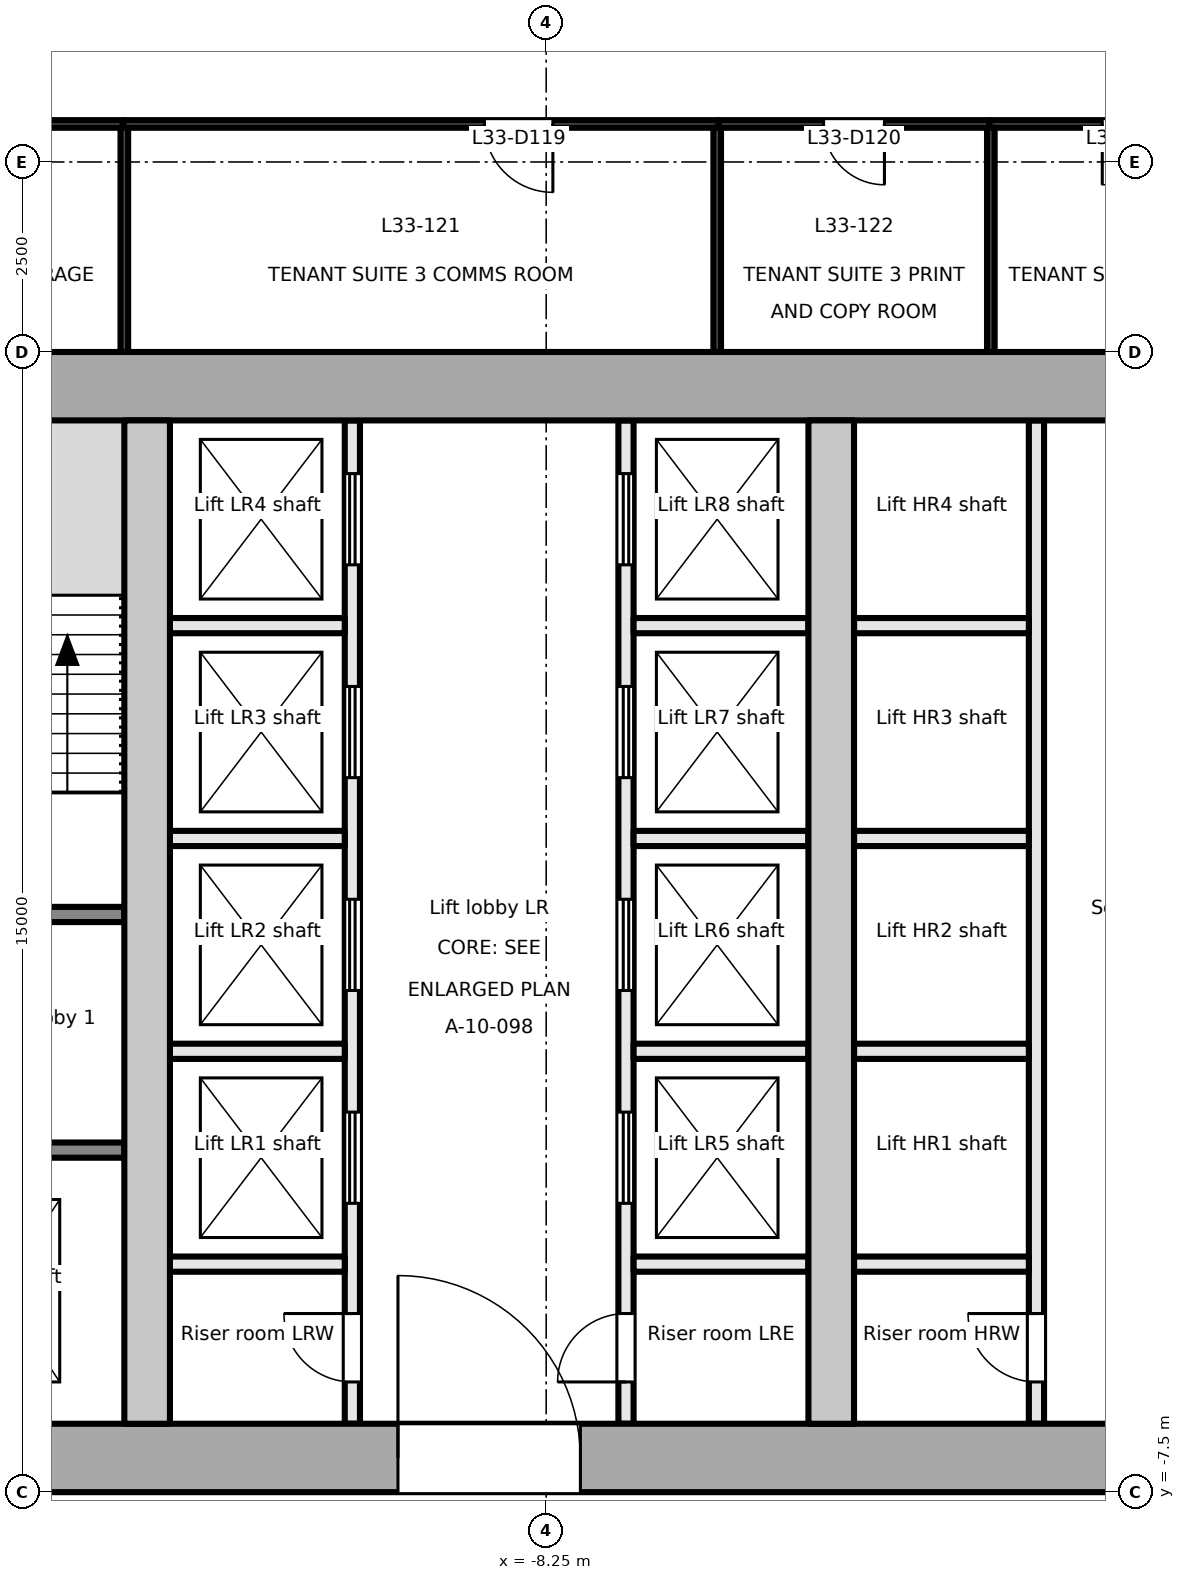
"""IFC4 building model, lengths in metres.
Left out: names, types, materials, properties, quantities, classifications, styles, units other than length and angle.
Written with IfcOpenShell. Run it as: python <this file> out.ifc"""

import sys

from ifc_helpers import new_model, si_unit, direction, frame, frame_2d, origin, place, context, subcontext, project, spatial, rectangle, extrude, element, fill, save


model = new_model("IFC4")
c1 = context("Model", 3, precision=1e-05, world=origin(), true_north=direction((0.0, 1.0)))
c2 = subcontext(c1, "Body", "Model", "MODEL_VIEW")
j1 = project(units=[si_unit("LENGTHUNIT", "METRE"), si_unit("PLANEANGLEUNIT", "RADIAN")], contexts=[c1])
p1 = place(None, origin())
s1 = spatial("IfcSite", under=j1, at=p1, CompositionType="ELEMENT")
p2 = place(p1, origin())
s2 = spatial("IfcBuilding", under=s1, at=p2, CompositionType="ELEMENT")
p3 = place(p2, frame((0.0, 0.0, 146.1)))
s3 = spatial("IfcBuildingStorey", under=s2, at=p3, CompositionType="ELEMENT", Elevation=146.1)
p4 = place(p3, frame((-18.0, -7.05, -0.2), z_axis=(0.0, 0.0, 1.0), x_axis=(1.0, 0.0, 0.0)))
e1 = element("IfcWall", 1, at=p4, inside=s3, PredefinedType="SHEAR", context=c2, shape_type="SweptSolid", body=[
    extrude(rectangle(XDim=36.0, YDim=0.9, at=frame_2d((18.0, 0.0))), origin(), (0.0, 0.0, 1.0), 4.0),
])
p5 = place(p4, frame((7.8, 0.0, 0.2)))
e2 = element("IfcOpeningElement", 2, at=p5, cuts=e1, PredefinedType="OPENING", context=c2, shape_type="SweptSolid", body=[
    extrude(rectangle(XDim=2.4, YDim=2.1, at=frame_2d((1.2, 1.05))), frame((0.0, 0.46, 0.0), z_axis=(0.0, -1.0, 0.0), x_axis=(1.0, 0.0, 0.0)), (0.0, 0.0, 1.0), 0.921),
])
p6 = place(p4, frame((17.4, 0.0, 0.2)))
e3 = element("IfcOpeningElement", 3, at=p6, cuts=e1, PredefinedType="OPENING", context=c2, shape_type="SweptSolid", body=[
    extrude(rectangle(XDim=1.2, YDim=2.1, at=frame_2d((0.6, 1.05))), frame((0.0, 0.46, 0.0), z_axis=(0.0, -1.0, 0.0), x_axis=(1.0, 0.0, 0.0)), (0.0, 0.0, 1.0), 0.921),
])
p7 = place(p4, frame((26.1, 0.0, 0.2)))
e4 = element("IfcOpeningElement", 4, at=p7, cuts=e1, PredefinedType="OPENING", context=c2, shape_type="SweptSolid", body=[
    extrude(rectangle(XDim=2.4, YDim=2.1, at=frame_2d((1.2, 1.05))), frame((0.0, 0.46, 0.0), z_axis=(0.0, -1.0, 0.0), x_axis=(1.0, 0.0, 0.0)), (0.0, 0.0, 1.0), 0.921),
])
p8 = place(p3, frame((-18.0, 7.05, -0.2), z_axis=(0.0, 0.0, 1.0), x_axis=(1.0, 0.0, 0.0)))
e5 = element("IfcWall", 5, at=p8, inside=s3, PredefinedType="SHEAR", context=c2, shape_type="SweptSolid", body=[
    extrude(rectangle(XDim=36.0, YDim=0.9, at=frame_2d((18.0, 0.0))), origin(), (0.0, 0.0, 1.0), 4.0),
])
for number, where, z_axis, x_axis in (
    (6, (-13.5, -6.6, -0.2), (0.0, 0.0, 1.0), (0.0, 1.0, 0.0)),
    (7, (-4.5, -6.6, -0.2), (0.0, 0.0, 1.0), (0.0, 1.0, 0.0)),
):
    element("IfcWall", number, at=place(p3, frame(where, z_axis=z_axis, x_axis=x_axis)), inside=s3, PredefinedType="SHEAR", context=c2, shape_type="SweptSolid", body=[
        extrude(rectangle(XDim=13.2, YDim=0.6, at=frame_2d((6.6, 0.0))), origin(), (0.0, 0.0, 1.0), 4.0),
    ])
p9 = place(p3, frame((-17.1, -3.0, 0.0), z_axis=(0.0, 0.0, 1.0), x_axis=(1.0, 0.0, 0.0)))
e8 = element("IfcWall", 8, at=p9, inside=s3, PredefinedType="PARTITIONING", context=c2, shape_type="SweptSolid", body=[
    extrude(rectangle(XDim=3.3, YDim=0.2, at=frame_2d((1.65, 0.0))), origin(), (0.0, 0.0, 1.0), 3.8),
])
p10 = place(p9, frame((1.1, 0.0, 0.0)))
e9 = element("IfcOpeningElement", 9, at=p10, cuts=e8, PredefinedType="OPENING", context=c2, shape_type="SweptSolid", body=[
    extrude(rectangle(XDim=1.1, YDim=2.1, at=frame_2d((0.55, 1.05))), frame((0.0, 0.111, 0.0), z_axis=(0.0, -1.0, 0.0), x_axis=(1.0, 0.0, 0.0)), (0.0, 0.0, 1.0), 0.221),
])
p11 = place(p3, frame((-17.1, 0.1, 0.0), z_axis=(0.0, 0.0, 1.0), x_axis=(1.0, 0.0, 0.0)))
e10 = element("IfcWall", 10, at=p11, inside=s3, PredefinedType="PARTITIONING", context=c2, shape_type="SweptSolid", body=[
    extrude(rectangle(XDim=3.3, YDim=0.2, at=frame_2d((1.65, 0.0))), origin(), (0.0, 0.0, 1.0), 3.8),
])
p12 = place(p11, frame((1.1, 0.0, 0.0)))
e11 = element("IfcOpeningElement", 11, at=p12, cuts=e10, PredefinedType="OPENING", context=c2, shape_type="SweptSolid", body=[
    extrude(rectangle(XDim=1.1, YDim=2.1, at=frame_2d((0.55, 1.05))), frame((0.0, 0.111, 0.0), z_axis=(0.0, -1.0, 0.0), x_axis=(1.0, 0.0, 0.0)), (0.0, 0.0, 1.0), 0.221),
])
p13 = place(p3, frame((-10.8, -6.6, 0.0), z_axis=(0.0, 0.0, 1.0), x_axis=(0.0, 1.0, 0.0)))
e12 = element("IfcWall", 12, at=p13, inside=s3, PredefinedType="PARTITIONING", context=c2, shape_type="SweptSolid", body=[
    extrude(rectangle(XDim=13.2, YDim=0.2, at=frame_2d((6.6, 0.0))), origin(), (0.0, 0.0, 1.0), 3.8),
])
p14 = place(p13, frame((0.55, 0.0, 0.0)))
e13 = element("IfcOpeningElement", 13, at=p14, cuts=e12, PredefinedType="OPENING", context=c2, shape_type="SweptSolid", body=[
    extrude(rectangle(XDim=0.9, YDim=2.1, at=frame_2d((0.45, 1.05))), frame((0.0, 0.111, 0.0), z_axis=(0.0, -1.0, 0.0), x_axis=(1.0, 0.0, 0.0)), (0.0, 0.0, 1.0), 0.221),
])
p15 = place(p13, frame((2.9, 0.0, 0.0)))
e14 = element("IfcOpeningElement", 14, at=p15, cuts=e12, PredefinedType="OPENING", context=c2, shape_type="SweptSolid", body=[
    extrude(rectangle(XDim=1.2, YDim=2.1, at=frame_2d((0.6, 1.05))), frame((0.0, 0.111, 0.0), z_axis=(0.0, -1.0, 0.0), x_axis=(1.0, 0.0, 0.0)), (0.0, 0.0, 1.0), 0.221),
])
p16 = place(p13, frame((5.7, 0.0, 0.0)))
e15 = element("IfcOpeningElement", 15, at=p16, cuts=e12, PredefinedType="OPENING", context=c2, shape_type="SweptSolid", body=[
    extrude(rectangle(XDim=1.2, YDim=2.1, at=frame_2d((0.6, 1.05))), frame((0.0, 0.111, 0.0), z_axis=(0.0, -1.0, 0.0), x_axis=(1.0, 0.0, 0.0)), (0.0, 0.0, 1.0), 0.221),
])
p17 = place(p13, frame((8.5, 0.0, 0.0)))
e16 = element("IfcOpeningElement", 16, at=p17, cuts=e12, PredefinedType="OPENING", context=c2, shape_type="SweptSolid", body=[
    extrude(rectangle(XDim=1.2, YDim=2.1, at=frame_2d((0.6, 1.05))), frame((0.0, 0.111, 0.0), z_axis=(0.0, -1.0, 0.0), x_axis=(1.0, 0.0, 0.0)), (0.0, 0.0, 1.0), 0.221),
])
p18 = place(p13, frame((11.3, 0.0, 0.0)))
e17 = element("IfcOpeningElement", 17, at=p18, cuts=e12, PredefinedType="OPENING", context=c2, shape_type="SweptSolid", body=[
    extrude(rectangle(XDim=1.2, YDim=2.1, at=frame_2d((0.6, 1.05))), frame((0.0, 0.111, 0.0), z_axis=(0.0, -1.0, 0.0), x_axis=(1.0, 0.0, 0.0)), (0.0, 0.0, 1.0), 0.221),
])
p19 = place(p3, frame((-7.2, -6.6, 0.0), z_axis=(0.0, 0.0, 1.0), x_axis=(0.0, 1.0, 0.0)))
e18 = element("IfcWall", 18, at=p19, inside=s3, PredefinedType="PARTITIONING", context=c2, shape_type="SweptSolid", body=[
    extrude(rectangle(XDim=13.2, YDim=0.2, at=frame_2d((6.6, 0.0))), origin(), (0.0, 0.0, 1.0), 3.8),
])
p20 = place(p19, frame((0.55, 0.0, 0.0)))
e19 = element("IfcOpeningElement", 19, at=p20, cuts=e18, PredefinedType="OPENING", context=c2, shape_type="SweptSolid", body=[
    extrude(rectangle(XDim=0.9, YDim=2.1, at=frame_2d((0.45, 1.05))), frame((0.0, 0.111, 0.0), z_axis=(0.0, -1.0, 0.0), x_axis=(1.0, 0.0, 0.0)), (0.0, 0.0, 1.0), 0.221),
])
p21 = place(p19, frame((2.9, 0.0, 0.0)))
e20 = element("IfcOpeningElement", 20, at=p21, cuts=e18, PredefinedType="OPENING", context=c2, shape_type="SweptSolid", body=[
    extrude(rectangle(XDim=1.2, YDim=2.1, at=frame_2d((0.6, 1.05))), frame((0.0, 0.111, 0.0), z_axis=(0.0, -1.0, 0.0), x_axis=(1.0, 0.0, 0.0)), (0.0, 0.0, 1.0), 0.221),
])
p22 = place(p19, frame((5.7, 0.0, 0.0)))
e21 = element("IfcOpeningElement", 21, at=p22, cuts=e18, PredefinedType="OPENING", context=c2, shape_type="SweptSolid", body=[
    extrude(rectangle(XDim=1.2, YDim=2.1, at=frame_2d((0.6, 1.05))), frame((0.0, 0.111, 0.0), z_axis=(0.0, -1.0, 0.0), x_axis=(1.0, 0.0, 0.0)), (0.0, 0.0, 1.0), 0.221),
])
p23 = place(p19, frame((8.5, 0.0, 0.0)))
e22 = element("IfcOpeningElement", 22, at=p23, cuts=e18, PredefinedType="OPENING", context=c2, shape_type="SweptSolid", body=[
    extrude(rectangle(XDim=1.2, YDim=2.1, at=frame_2d((0.6, 1.05))), frame((0.0, 0.111, 0.0), z_axis=(0.0, -1.0, 0.0), x_axis=(1.0, 0.0, 0.0)), (0.0, 0.0, 1.0), 0.221),
])
p24 = place(p19, frame((11.3, 0.0, 0.0)))
e23 = element("IfcOpeningElement", 23, at=p24, cuts=e18, PredefinedType="OPENING", context=c2, shape_type="SweptSolid", body=[
    extrude(rectangle(XDim=1.2, YDim=2.1, at=frame_2d((0.6, 1.05))), frame((0.0, 0.111, 0.0), z_axis=(0.0, -1.0, 0.0), x_axis=(1.0, 0.0, 0.0)), (0.0, 0.0, 1.0), 0.221),
])
for number, where, z_axis, x_axis in (
    (24, (-13.2, -1.7, 0.0), (0.0, 0.0, 1.0), (1.0, 0.0, 0.0)),
    (25, (-13.2, 1.1, 0.0), (0.0, 0.0, 1.0), (1.0, 0.0, 0.0)),
    (26, (-13.2, 3.9, 0.0), (0.0, 0.0, 1.0), (1.0, 0.0, 0.0)),
    (27, (-13.2, -4.5, 0.0), (0.0, 0.0, 1.0), (1.0, 0.0, 0.0)),
    (28, (-7.1, -1.7, 0.0), (0.0, 0.0, 1.0), (1.0, 0.0, 0.0)),
    (29, (-7.1, 1.1, 0.0), (0.0, 0.0, 1.0), (1.0, 0.0, 0.0)),
    (30, (-7.1, 3.9, 0.0), (0.0, 0.0, 1.0), (1.0, 0.0, 0.0)),
    (31, (-7.1, -4.5, 0.0), (0.0, 0.0, 1.0), (1.0, 0.0, 0.0)),
):
    element("IfcWall", number, at=place(p3, frame(where, z_axis=z_axis, x_axis=x_axis)), inside=s3, PredefinedType="PARTITIONING", context=c2, shape_type="SweptSolid", body=[
        extrude(rectangle(XDim=2.3, YDim=0.2, at=frame_2d((1.15, 0.0))), origin(), (0.0, 0.0, 1.0), 3.8),
    ])
p25 = place(p3, frame((-1.8, -6.6, 0.0), z_axis=(0.0, 0.0, 1.0), x_axis=(0.0, 1.0, 0.0)))
e32 = element("IfcWall", 32, at=p25, inside=s3, PredefinedType="PARTITIONING", context=c2, shape_type="SweptSolid", body=[
    extrude(rectangle(XDim=13.2, YDim=0.2, at=frame_2d((6.6, 0.0))), origin(), (0.0, 0.0, 1.0), 3.8),
])
p26 = place(p25, frame((0.55, 0.0, 0.0)))
e33 = element("IfcOpeningElement", 33, at=p26, cuts=e32, PredefinedType="OPENING", context=c2, shape_type="SweptSolid", body=[
    extrude(rectangle(XDim=0.9, YDim=2.1, at=frame_2d((0.45, 1.05))), frame((0.0, 0.111, 0.0), z_axis=(0.0, -1.0, 0.0), x_axis=(1.0, 0.0, 0.0)), (0.0, 0.0, 1.0), 0.221),
])
for number, where, z_axis, x_axis in (
    (34, (-4.2, -1.7, 0.0), (0.0, 0.0, 1.0), (1.0, 0.0, 0.0)),
    (35, (-4.2, 1.1, 0.0), (0.0, 0.0, 1.0), (1.0, 0.0, 0.0)),
    (36, (-4.2, 3.9, 0.0), (0.0, 0.0, 1.0), (1.0, 0.0, 0.0)),
    (37, (-4.2, -4.5, 0.0), (0.0, 0.0, 1.0), (1.0, 0.0, 0.0)),
):
    element("IfcWall", number, at=place(p3, frame(where, z_axis=z_axis, x_axis=x_axis)), inside=s3, PredefinedType="PARTITIONING", context=c2, shape_type="SweptSolid", body=[
        extrude(rectangle(XDim=2.3, YDim=0.2, at=frame_2d((1.15, 0.0))), origin(), (0.0, 0.0, 1.0), 3.8),
    ])
p27 = place(p3, frame((-13.82, 10.5, 0.0), z_axis=(0.0, 0.0, 1.0), x_axis=(-1.0, 0.0, 0.0)))
e38 = element("IfcWall", 38, at=p27, inside=s3, PredefinedType="PARTITIONING", context=c2, shape_type="SweptSolid", body=[
    extrude(rectangle(XDim=4.105, YDim=0.1, at=frame_2d((2.052, 0.0))), origin(), (0.0, 0.0, 1.0), 3.8),
])
p28 = place(p27, frame((1.653, 0.0, 0.0)))
e39 = element("IfcOpeningElement", 39, at=p28, cuts=e38, PredefinedType="OPENING", context=c2, shape_type="SweptSolid", body=[
    extrude(rectangle(XDim=0.8, YDim=2.1, at=frame_2d((0.4, 1.05))), frame((0.0, 0.061, 0.0), z_axis=(0.0, -1.0, 0.0), x_axis=(1.0, 0.0, 0.0)), (0.0, 0.0, 1.0), 0.121),
])
p29 = place(p3, frame((-5.98, 10.5, 0.0), z_axis=(0.0, 0.0, 1.0), x_axis=(-1.0, 0.0, 0.0)))
e40 = element("IfcWall", 40, at=p29, inside=s3, PredefinedType="PARTITIONING", context=c2, shape_type="SweptSolid", body=[
    extrude(rectangle(XDim=7.84, YDim=0.1, at=frame_2d((3.92, 0.0))), origin(), (0.0, 0.0, 1.0), 3.5),
])
p30 = place(p29, frame((2.182, 0.0, 0.0)))
e41 = element("IfcOpeningElement", 41, at=p30, cuts=e40, PredefinedType="OPENING", context=c2, shape_type="SweptSolid", body=[
    extrude(rectangle(XDim=0.9, YDim=2.1, at=frame_2d((0.45, 1.05))), frame((0.0, 0.061, 0.0), z_axis=(0.0, -1.0, 0.0), x_axis=(1.0, 0.0, 0.0)), (0.0, 0.0, 1.0), 0.121),
])
p31 = place(p3, frame((-2.42, 10.5, 0.0), z_axis=(0.0, 0.0, 1.0), x_axis=(-1.0, 0.0, 0.0)))
e42 = element("IfcWall", 42, at=p31, inside=s3, PredefinedType="PARTITIONING", context=c2, shape_type="SweptSolid", body=[
    extrude(rectangle(XDim=3.56, YDim=0.1, at=frame_2d((1.78, 0.0))), origin(), (0.0, 0.0, 1.0), 3.5),
])
p32 = place(p31, frame((1.38, 0.0, 0.0)))
e43 = element("IfcOpeningElement", 43, at=p32, cuts=e42, PredefinedType="OPENING", context=c2, shape_type="SweptSolid", body=[
    extrude(rectangle(XDim=0.8, YDim=2.1, at=frame_2d((0.4, 1.05))), frame((0.0, 0.061, 0.0), z_axis=(0.0, -1.0, 0.0), x_axis=(1.0, 0.0, 0.0)), (0.0, 0.0, 1.0), 0.121),
])
p33 = place(p3, frame((3.0, 10.5, 0.0), z_axis=(0.0, 0.0, 1.0), x_axis=(-1.0, 0.0, 0.0)))
e44 = element("IfcWall", 44, at=p33, inside=s3, PredefinedType="PARTITIONING", context=c2, shape_type="SweptSolid", body=[
    extrude(rectangle(XDim=5.42, YDim=0.1, at=frame_2d((2.71, 0.0))), origin(), (0.0, 0.0, 1.0), 3.5),
])
p34 = place(p33, frame((3.134, 0.0, 0.0)))
e45 = element("IfcOpeningElement", 45, at=p34, cuts=e44, PredefinedType="OPENING", context=c2, shape_type="SweptSolid", body=[
    extrude(rectangle(XDim=0.8, YDim=2.1, at=frame_2d((0.4, 1.05))), frame((0.0, 0.061, 0.0), z_axis=(0.0, -1.0, 0.0), x_axis=(1.0, 0.0, 0.0)), (0.0, 0.0, 1.0), 0.121),
])
p35 = place(p33, frame((0.692, 0.0, 0.9)))
e46 = element("IfcOpeningElement", 46, at=p35, cuts=e44, PredefinedType="OPENING", context=c2, shape_type="SweptSolid", body=[
    extrude(rectangle(XDim=1.8, YDim=1.2, at=frame_2d((0.9, 0.6))), frame((0.0, 0.061, 0.0), z_axis=(0.0, -1.0, 0.0), x_axis=(1.0, 0.0, 0.0)), (0.0, 0.0, 1.0), 0.121),
])
for number, where, z_axis, x_axis in (
    (47, (-13.8, 10.45, 0.0), (0.0, 0.0, 1.0), (0.0, -1.0, 0.0)),
    (48, (-6.0, 10.45, 0.0), (0.0, 0.0, 1.0), (0.0, -1.0, 0.0)),
    (49, (-2.4, 10.45, 0.0), (0.0, 0.0, 1.0), (0.0, -1.0, 0.0)),
):
    element("IfcWall", number, at=place(p3, frame(where, z_axis=z_axis, x_axis=x_axis)), inside=s3, PredefinedType="PARTITIONING", context=c2, shape_type="SweptSolid", body=[
        extrude(rectangle(XDim=2.95, YDim=0.1, at=frame_2d((1.475, 0.0))), origin(), (0.0, 0.0, 1.0), 3.8),
    ])
p36 = place(p14, origin())
e50 = element("IfcDoor", 50, at=p36, inside=s3, OperationType="SINGLE_SWING_RIGHT", PredefinedType="DOOR", context=c2, shape_type="SweptSolid", body=[
    extrude(rectangle(XDim=0.9, YDim=2.1, at=frame_2d((0.45, 1.05))), frame((0.0, 0.025, 0.0), z_axis=(0.0, -1.0, 0.0), x_axis=(1.0, 0.0, 0.0)), (0.0, 0.0, 1.0), 0.05),
])
fill(e13, e50)
p37 = place(p15, origin())
e51 = element("IfcDoor", 51, at=p37, inside=s3, OperationType="DOUBLE_DOOR_SLIDING", PredefinedType="DOOR", context=c2, shape_type="SweptSolid", body=[
    extrude(rectangle(XDim=1.2, YDim=2.1, at=frame_2d((0.6, 1.05))), frame((0.0, 0.025, 0.0), z_axis=(0.0, -1.0, 0.0), x_axis=(1.0, 0.0, 0.0)), (0.0, 0.0, 1.0), 0.05),
])
fill(e14, e51)
p38 = place(p16, origin())
e52 = element("IfcDoor", 52, at=p38, inside=s3, OperationType="DOUBLE_DOOR_SLIDING", PredefinedType="DOOR", context=c2, shape_type="SweptSolid", body=[
    extrude(rectangle(XDim=1.2, YDim=2.1, at=frame_2d((0.6, 1.05))), frame((0.0, 0.025, 0.0), z_axis=(0.0, -1.0, 0.0), x_axis=(1.0, 0.0, 0.0)), (0.0, 0.0, 1.0), 0.05),
])
fill(e15, e52)
p39 = place(p17, origin())
e53 = element("IfcDoor", 53, at=p39, inside=s3, OperationType="DOUBLE_DOOR_SLIDING", PredefinedType="DOOR", context=c2, shape_type="SweptSolid", body=[
    extrude(rectangle(XDim=1.2, YDim=2.1, at=frame_2d((0.6, 1.05))), frame((0.0, 0.025, 0.0), z_axis=(0.0, -1.0, 0.0), x_axis=(1.0, 0.0, 0.0)), (0.0, 0.0, 1.0), 0.05),
])
fill(e16, e53)
p40 = place(p18, origin())
e54 = element("IfcDoor", 54, at=p40, inside=s3, OperationType="DOUBLE_DOOR_SLIDING", PredefinedType="DOOR", context=c2, shape_type="SweptSolid", body=[
    extrude(rectangle(XDim=1.2, YDim=2.1, at=frame_2d((0.6, 1.05))), frame((0.0, 0.025, 0.0), z_axis=(0.0, -1.0, 0.0), x_axis=(1.0, 0.0, 0.0)), (0.0, 0.0, 1.0), 0.05),
])
fill(e17, e54)
p41 = place(p20, origin())
e55 = element("IfcDoor", 55, at=p41, inside=s3, OperationType="SINGLE_SWING_LEFT", PredefinedType="DOOR", context=c2, shape_type="SweptSolid", body=[
    extrude(rectangle(XDim=0.9, YDim=2.1, at=frame_2d((0.45, 1.05))), frame((0.0, 0.025, 0.0), z_axis=(0.0, -1.0, 0.0), x_axis=(1.0, 0.0, 0.0)), (0.0, 0.0, 1.0), 0.05),
])
fill(e19, e55)
p42 = place(p21, origin())
e56 = element("IfcDoor", 56, at=p42, inside=s3, OperationType="DOUBLE_DOOR_SLIDING", PredefinedType="DOOR", context=c2, shape_type="SweptSolid", body=[
    extrude(rectangle(XDim=1.2, YDim=2.1, at=frame_2d((0.6, 1.05))), frame((0.0, 0.025, 0.0), z_axis=(0.0, -1.0, 0.0), x_axis=(1.0, 0.0, 0.0)), (0.0, 0.0, 1.0), 0.05),
])
fill(e20, e56)
p43 = place(p22, origin())
e57 = element("IfcDoor", 57, at=p43, inside=s3, OperationType="DOUBLE_DOOR_SLIDING", PredefinedType="DOOR", context=c2, shape_type="SweptSolid", body=[
    extrude(rectangle(XDim=1.2, YDim=2.1, at=frame_2d((0.6, 1.05))), frame((0.0, 0.025, 0.0), z_axis=(0.0, -1.0, 0.0), x_axis=(1.0, 0.0, 0.0)), (0.0, 0.0, 1.0), 0.05),
])
fill(e21, e57)
p44 = place(p23, origin())
e58 = element("IfcDoor", 58, at=p44, inside=s3, OperationType="DOUBLE_DOOR_SLIDING", PredefinedType="DOOR", context=c2, shape_type="SweptSolid", body=[
    extrude(rectangle(XDim=1.2, YDim=2.1, at=frame_2d((0.6, 1.05))), frame((0.0, 0.025, 0.0), z_axis=(0.0, -1.0, 0.0), x_axis=(1.0, 0.0, 0.0)), (0.0, 0.0, 1.0), 0.05),
])
fill(e22, e58)
p45 = place(p24, origin())
e59 = element("IfcDoor", 59, at=p45, inside=s3, OperationType="DOUBLE_DOOR_SLIDING", PredefinedType="DOOR", context=c2, shape_type="SweptSolid", body=[
    extrude(rectangle(XDim=1.2, YDim=2.1, at=frame_2d((0.6, 1.05))), frame((0.0, 0.025, 0.0), z_axis=(0.0, -1.0, 0.0), x_axis=(1.0, 0.0, 0.0)), (0.0, 0.0, 1.0), 0.05),
])
fill(e23, e59)
p46 = place(p5, origin())
e60 = element("IfcDoor", 60, at=p46, inside=s3, OperationType="DOUBLE_DOOR_DOUBLE_SWING", PredefinedType="DOOR", context=c2, shape_type="SweptSolid", body=[
    extrude(rectangle(XDim=2.4, YDim=2.1, at=frame_2d((1.2, 1.05))), frame((0.0, 0.025, 0.0), z_axis=(0.0, -1.0, 0.0), x_axis=(1.0, 0.0, 0.0)), (0.0, 0.0, 1.0), 0.05),
])
fill(e2, e60)
p47 = place(p26, origin())
e61 = element("IfcDoor", 61, at=p47, inside=s3, OperationType="SINGLE_SWING_RIGHT", PredefinedType="DOOR", context=c2, shape_type="SweptSolid", body=[
    extrude(rectangle(XDim=0.9, YDim=2.1, at=frame_2d((0.45, 1.05))), frame((0.0, 0.025, 0.0), z_axis=(0.0, -1.0, 0.0), x_axis=(1.0, 0.0, 0.0)), (0.0, 0.0, 1.0), 0.05),
])
fill(e33, e61)
p48 = place(p30, origin())
e62 = element("IfcDoor", 62, at=p48, inside=s3, OperationType="SINGLE_SWING_LEFT", PredefinedType="DOOR", context=c2, shape_type="SweptSolid", body=[
    extrude(rectangle(XDim=0.9, YDim=2.1, at=frame_2d((0.45, 1.05))), frame((0.0, 0.025, 0.0), z_axis=(0.0, -1.0, 0.0), x_axis=(1.0, 0.0, 0.0)), (0.0, 0.0, 1.0), 0.05),
])
fill(e41, e62)
p49 = place(p32, origin())
e63 = element("IfcDoor", 63, at=p49, inside=s3, OperationType="SINGLE_SWING_LEFT", PredefinedType="DOOR", context=c2, shape_type="SweptSolid", body=[
    extrude(rectangle(XDim=0.8, YDim=2.1, at=frame_2d((0.4, 1.05))), frame((0.0, 0.025, 0.0), z_axis=(0.0, -1.0, 0.0), x_axis=(1.0, 0.0, 0.0)), (0.0, 0.0, 1.0), 0.05),
])
fill(e43, e63)
p50 = place(p34, origin())
e64 = element("IfcDoor", 64, at=p50, inside=s3, OperationType="SINGLE_SWING_RIGHT", PredefinedType="DOOR", context=c2, shape_type="SweptSolid", body=[
    extrude(rectangle(XDim=0.8, YDim=2.1, at=frame_2d((0.4, 1.05))), frame((0.0, 0.025, 0.0), z_axis=(0.0, -1.0, 0.0), x_axis=(1.0, 0.0, 0.0)), (0.0, 0.0, 1.0), 0.05),
])
fill(e45, e64)
save(model, sys.argv[1])
